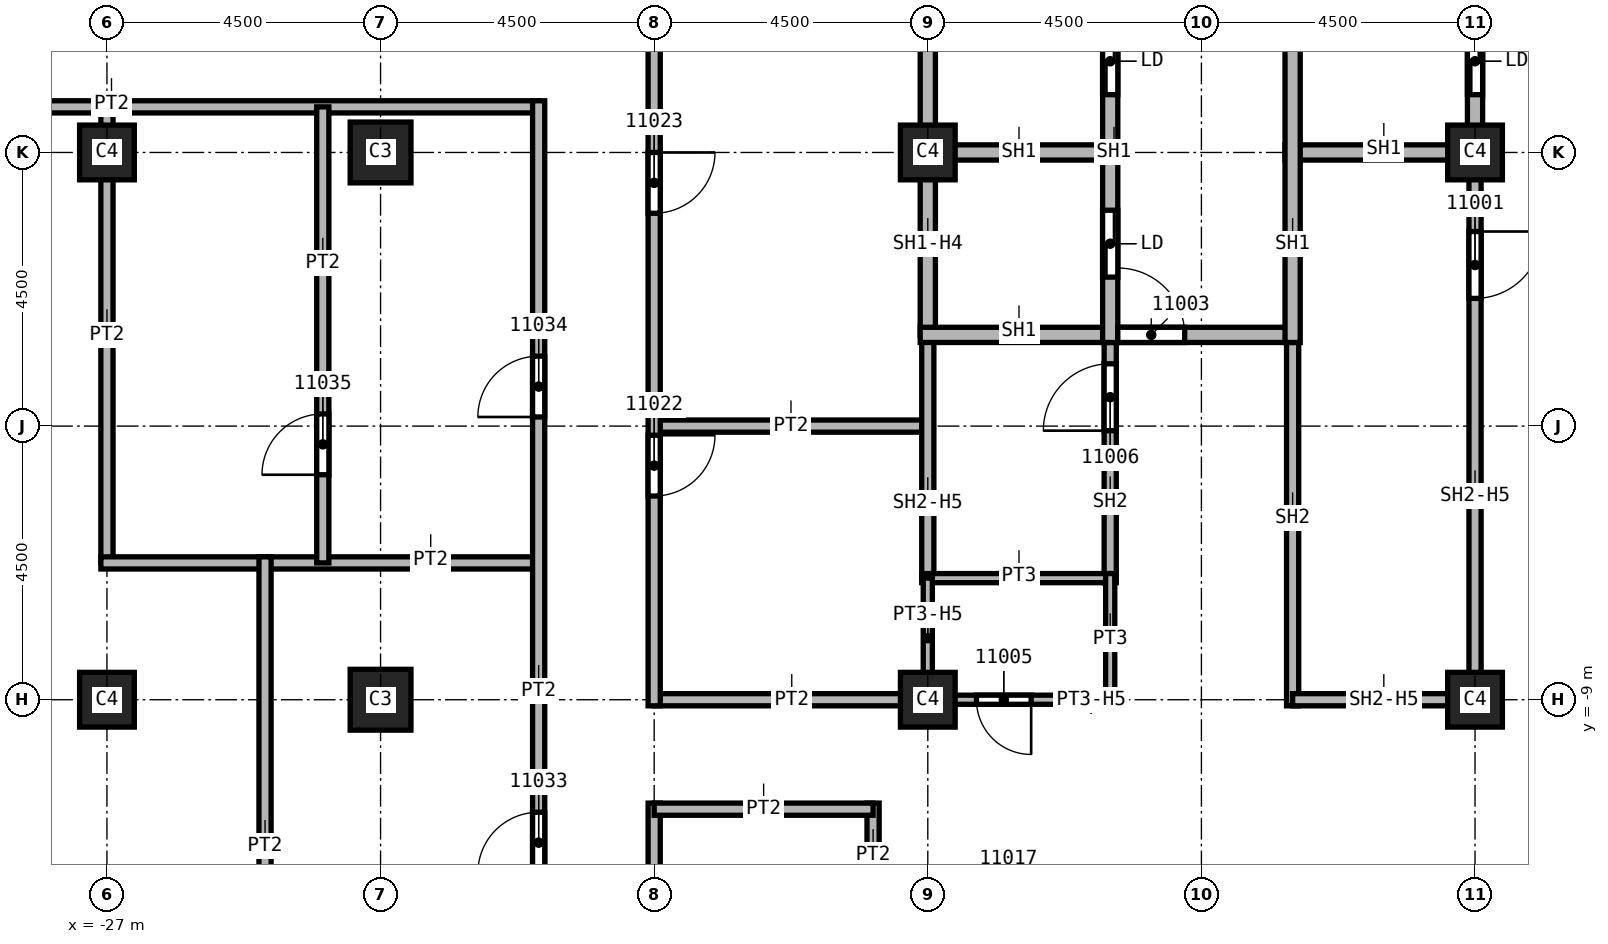
"""IFC4 building model, lengths in metres.
Left out: names, types, materials, properties, quantities, classifications, styles, units other than length and angle.
Written with IfcOpenShell. Run it as: python <this file> out.ifc"""

import sys

from ifc_helpers import new_model, si_unit, direction, frame, frame_2d, origin, origin_2d, place, context, subcontext, project, spatial, rectangle, extrude, element, fill, save


model = new_model("IFC4")
c1 = context("Model", 3, precision=1e-05, world=origin(), true_north=direction((0.0, 1.0)))
c2 = subcontext(c1, "Body", "Model", "MODEL_VIEW")
j1 = project(units=[si_unit("LENGTHUNIT", "METRE"), si_unit("PLANEANGLEUNIT", "RADIAN")], contexts=[c1])
p1 = place(None, origin())
s1 = spatial("IfcSite", under=j1, at=p1, CompositionType="ELEMENT")
p2 = place(p1, origin())
s2 = spatial("IfcBuilding", under=s1, at=p2, CompositionType="ELEMENT")
p3 = place(p2, frame((0.0, 0.0, 184.0)))
s3 = spatial("IfcBuildingStorey", under=s2, at=p3, CompositionType="ELEMENT", Elevation=184.0)
for number, where, z_axis, x_axis in (
    (1, (-22.5, 0.0, 0.0), (0.0, 0.0, 1.0), (1.0, 0.0, 0.0)),
    (2, (-22.5, -9.0, 0.0), (0.0, 0.0, 1.0), (1.0, 0.0, 0.0)),
):
    element("IfcColumn", number, at=place(p3, frame(where, z_axis=z_axis, x_axis=x_axis)), inside=s3, PredefinedType="COLUMN", context=c2, shape_type="SweptSolid", body=[
        extrude(rectangle(XDim=1.0, YDim=1.0, at=origin_2d()), origin(), (0.0, 0.0, 1.0), 3.72),
    ])
for number, where, z_axis, x_axis in (
    (3, (-4.5, 0.0, 0.0), (0.0, 0.0, 1.0), (1.0, 0.0, 0.0)),
    (4, (-4.5, -9.0, 0.0), (0.0, 0.0, 1.0), (1.0, 0.0, 0.0)),
    (5, (-13.5, 0.0, 0.0), (0.0, 0.0, 1.0), (1.0, 0.0, 0.0)),
    (6, (-13.5, -9.0, 0.0), (0.0, 0.0, 1.0), (1.0, 0.0, 0.0)),
    (7, (-27.0, 0.0, 0.0), (0.0, 0.0, 1.0), (1.0, 0.0, 0.0)),
    (8, (-27.0, -9.0, 0.0), (0.0, 0.0, 1.0), (1.0, 0.0, 0.0)),
):
    element("IfcColumn", number, at=place(p3, frame(where, z_axis=z_axis, x_axis=x_axis)), inside=s3, PredefinedType="COLUMN", context=c2, shape_type="SweptSolid", body=[
        extrude(rectangle(XDim=0.9, YDim=0.9, at=origin_2d()), origin(), (0.0, 0.0, 1.0), 3.72),
    ])
p4 = place(p3, frame((-27.0, -6.75, 0.0), z_axis=(0.0, 0.0, 1.0), x_axis=(0.0, 1.0, 0.0)))
e9 = element("IfcWall", 9, at=p4, inside=s3, PredefinedType="PARTITIONING", context=c2, shape_type="SweptSolid", body=[
    extrude(rectangle(XDim=7.5, YDim=0.2, at=frame_2d((3.75, 0.0))), origin(), (0.0, 0.0, 1.0), 3.72),
])
p5 = place(p3, frame((-19.9, 0.75, 0.0), z_axis=(0.0, 0.0, 1.0), x_axis=(-1.0, 0.0, 0.0)))
e10 = element("IfcWall", 10, at=p5, inside=s3, PredefinedType="PARTITIONING", context=c2, shape_type="SweptSolid", body=[
    extrude(rectangle(XDim=13.95, YDim=0.2, at=frame_2d((6.975, 0.0))), origin(), (0.0, 0.0, 1.0), 3.72),
])
p6 = place(p3, frame((-27.1, -6.75, 0.0), z_axis=(0.0, 0.0, 1.0), x_axis=(1.0, 0.0, 0.0)))
e11 = element("IfcWall", 11, at=p6, inside=s3, PredefinedType="PARTITIONING", context=c2, shape_type="SweptSolid", body=[
    extrude(rectangle(XDim=7.2, YDim=0.2, at=frame_2d((3.6, 0.0))), origin(), (0.0, 0.0, 1.0), 3.72),
])
p7 = place(p3, frame((-24.4, -17.5, 0.0), z_axis=(0.0, 0.0, 1.0), x_axis=(0.0, 1.0, 0.0)))
e12 = element("IfcWall", 12, at=p7, inside=s3, PredefinedType="PARTITIONING", context=c2, shape_type="SweptSolid", body=[
    extrude(rectangle(XDim=10.85, YDim=0.2, at=frame_2d((5.425, 0.0))), origin(), (0.0, 0.0, 1.0), 3.72),
])
p8 = place(p3, frame((-23.45, -6.75, 0.0), z_axis=(0.0, 0.0, 1.0), x_axis=(0.0, 1.0, 0.0)))
e13 = element("IfcWall", 13, at=p8, inside=s3, PredefinedType="PARTITIONING", context=c2, shape_type="SweptSolid", body=[
    extrude(rectangle(XDim=7.5, YDim=0.2, at=frame_2d((3.75, 0.0))), origin(), (0.0, 0.0, 1.0), 3.72),
])
p9 = place(p8, frame((1.45, 0.0, 0.0)))
e14 = element("IfcOpeningElement", 14, at=p9, cuts=e13, PredefinedType="OPENING", context=c2, shape_type="SweptSolid", body=[
    extrude(rectangle(XDim=1.0, YDim=2.1, at=frame_2d((0.5, 1.05))), frame((0.0, 0.1, 0.0), z_axis=(0.0, -1.0, 0.0), x_axis=(1.0, 0.0, 0.0)), (0.0, 0.0, 1.0), 0.2),
])
p10 = place(p3, frame((-19.9, -22.4, 0.0), z_axis=(0.0, 0.0, 1.0), x_axis=(0.0, 1.0, 0.0)))
e15 = element("IfcWall", 15, at=p10, inside=s3, PredefinedType="PARTITIONING", context=c2, shape_type="SweptSolid", body=[
    extrude(rectangle(XDim=23.25, YDim=0.2, at=frame_2d((11.625, 0.0))), origin(), (0.0, 0.0, 1.0), 3.72),
])
p11 = place(p10, frame((3.7, 0.0, 0.0)))
e16 = element("IfcOpeningElement", 16, at=p11, cuts=e15, PredefinedType="OPENING", context=c2, shape_type="SweptSolid", body=[
    extrude(rectangle(XDim=1.0, YDim=2.1, at=frame_2d((0.5, 1.05))), frame((0.0, 0.1, 0.0), z_axis=(0.0, -1.0, 0.0), x_axis=(1.0, 0.0, 0.0)), (0.0, 0.0, 1.0), 0.2),
])
p12 = place(p10, frame((10.55, 0.0, 0.0)))
e17 = element("IfcOpeningElement", 17, at=p12, cuts=e15, PredefinedType="OPENING", context=c2, shape_type="SweptSolid", body=[
    extrude(rectangle(XDim=1.0, YDim=2.1, at=frame_2d((0.5, 1.05))), frame((0.0, 0.1, 0.0), z_axis=(0.0, -1.0, 0.0), x_axis=(1.0, 0.0, 0.0)), (0.0, 0.0, 1.0), 0.2),
])
p13 = place(p10, frame((18.05, 0.0, 0.0)))
e18 = element("IfcOpeningElement", 18, at=p13, cuts=e15, PredefinedType="OPENING", context=c2, shape_type="SweptSolid", body=[
    extrude(rectangle(XDim=1.0, YDim=2.1, at=frame_2d((0.5, 1.05))), frame((0.0, 0.1, 0.0), z_axis=(0.0, -1.0, 0.0), x_axis=(1.0, 0.0, 0.0)), (0.0, 0.0, 1.0), 0.2),
])
p14 = place(p3, frame((-18.0, -10.7, 0.0), z_axis=(0.0, 0.0, 1.0), x_axis=(0.0, -1.0, 0.0)))
e19 = element("IfcWall", 19, at=p14, inside=s3, PredefinedType="PARTITIONING", context=c2, shape_type="SweptSolid", body=[
    extrude(rectangle(XDim=11.6, YDim=0.2, at=frame_2d((5.8, 0.0))), origin(), (0.0, 0.0, 1.0), 3.72),
])
p15 = place(p14, frame((3.35, 0.0, 0.0)))
e20 = element("IfcOpeningElement", 20, at=p15, cuts=e19, PredefinedType="OPENING", context=c2, shape_type="SweptSolid", body=[
    extrude(rectangle(XDim=1.0, YDim=2.1, at=frame_2d((0.5, 1.05))), frame((0.0, 0.1, 0.0), z_axis=(0.0, -1.0, 0.0), x_axis=(1.0, 0.0, 0.0)), (0.0, 0.0, 1.0), 0.2),
])
for number, where, z_axis, x_axis in (
    (21, (-18.0, -9.0, 0.0), (0.0, 0.0, 1.0), (1.0, 0.0, 0.0)),
    (22, (-18.0, -4.5, 0.0), (0.0, 0.0, 1.0), (1.0, 0.0, 0.0)),
):
    element("IfcWall", number, at=place(p3, frame(where, z_axis=z_axis, x_axis=x_axis)), inside=s3, PredefinedType="PARTITIONING", context=c2, shape_type="SweptSolid", body=[
        extrude(rectangle(XDim=4.5, YDim=0.2, at=frame_2d((2.25, 0.0))), origin(), (0.0, 0.0, 1.0), 3.72),
    ])
p16 = place(p3, frame((-18.0, 9.1, 0.0), z_axis=(0.0, 0.0, 1.0), x_axis=(0.0, -1.0, 0.0)))
e23 = element("IfcWall", 23, at=p16, inside=s3, PredefinedType="PARTITIONING", context=c2, shape_type="SweptSolid", body=[
    extrude(rectangle(XDim=18.2, YDim=0.2, at=frame_2d((9.1, 0.0))), origin(), (0.0, 0.0, 1.0), 3.72),
])
p17 = place(p16, frame((13.75, 0.0, 0.0)))
e24 = element("IfcOpeningElement", 24, at=p17, cuts=e23, PredefinedType="OPENING", context=c2, shape_type="SweptSolid", body=[
    extrude(rectangle(XDim=1.0, YDim=2.1, at=frame_2d((0.5, 1.05))), frame((0.0, 0.1, 0.0), z_axis=(0.0, -1.0, 0.0), x_axis=(1.0, 0.0, 0.0)), (0.0, 0.0, 1.0), 0.2),
])
p18 = place(p16, frame((9.1, 0.0, 0.0)))
e25 = element("IfcOpeningElement", 25, at=p18, cuts=e23, PredefinedType="OPENING", context=c2, shape_type="SweptSolid", body=[
    extrude(rectangle(XDim=1.0, YDim=2.1, at=frame_2d((0.5, 1.05))), frame((0.0, 0.1, 0.0), z_axis=(0.0, -1.0, 0.0), x_axis=(1.0, 0.0, 0.0)), (0.0, 0.0, 1.0), 0.2),
])
p19 = place(p3, frame((-14.4, -12.3, 0.0), z_axis=(0.0, 0.0, 1.0), x_axis=(0.0, 1.0, 0.0)))
e26 = element("IfcWall", 26, at=p19, inside=s3, PredefinedType="PARTITIONING", context=c2, shape_type="SweptSolid", body=[
    extrude(rectangle(XDim=1.6, YDim=0.2, at=frame_2d((0.8, 0.0))), origin(), (0.0, 0.0, 1.0), 3.72),
])
p20 = place(p3, frame((-14.4, -10.8, 0.0), z_axis=(0.0, 0.0, 1.0), x_axis=(-1.0, 0.0, 0.0)))
e27 = element("IfcWall", 27, at=p20, inside=s3, PredefinedType="PARTITIONING", context=c2, shape_type="SweptSolid", body=[
    extrude(rectangle(XDim=3.6, YDim=0.2, at=frame_2d((1.8, 0.0))), origin(), (0.0, 0.0, 1.0), 3.72),
])
p21 = place(p3, frame((-13.5, -7.0, 0.0), z_axis=(0.0, 0.0, 1.0), x_axis=(0.0, 1.0, 0.0)))
e28 = element("IfcWall", 28, at=p21, inside=s3, PredefinedType="SOLIDWALL", context=c2, shape_type="SweptSolid", body=[
    extrude(rectangle(XDim=4.0, YDim=0.2, at=frame_2d((2.0, 0.0))), origin(), (0.0, 0.0, 1.0), 2.958),
])
p22 = place(p3, frame((-10.5, -7.075, 0.0), z_axis=(0.0, 0.0, 1.0), x_axis=(0.0, 1.0, 0.0)))
e29 = element("IfcWall", 29, at=p22, inside=s3, PredefinedType="SOLIDWALL", context=c2, shape_type="SweptSolid", body=[
    extrude(rectangle(XDim=4.2, YDim=0.2, at=frame_2d((2.1, 0.0))), origin(), (0.0, 0.0, 1.0), 3.72),
])
p23 = place(p22, frame((2.5, 0.0, 0.0)))
e30 = element("IfcOpeningElement", 30, at=p23, cuts=e29, PredefinedType="OPENING", context=c2, shape_type="SweptSolid", body=[
    extrude(rectangle(XDim=1.1, YDim=2.1, at=frame_2d((0.55, 1.05))), frame((0.0, 0.1, 0.0), z_axis=(0.0, -1.0, 0.0), x_axis=(1.0, 0.0, 0.0)), (0.0, 0.0, 1.0), 0.2),
])
p24 = place(p3, frame((-7.5, -9.1, 0.0), z_axis=(0.0, 0.0, 1.0), x_axis=(0.0, 1.0, 0.0)))
e31 = element("IfcWall", 31, at=p24, inside=s3, PredefinedType="SOLIDWALL", context=c2, shape_type="SweptSolid", body=[
    extrude(rectangle(XDim=6.225, YDim=0.2, at=frame_2d((3.113, 0.0))), origin(), (0.0, 0.0, 1.0), 3.72),
])
p25 = place(p3, frame((-4.5, -9.0, 0.0), z_axis=(0.0, 0.0, 1.0), x_axis=(-1.0, 0.0, 0.0)))
e32 = element("IfcWall", 32, at=p25, inside=s3, PredefinedType="SOLIDWALL", context=c2, shape_type="SweptSolid", body=[
    extrude(rectangle(XDim=3.0, YDim=0.2, at=frame_2d((1.5, 0.0))), origin(), (0.0, 0.0, 1.0), 2.958),
])
p26 = place(p3, frame((-4.5, 0.0, 0.0), z_axis=(0.0, 0.0, 1.0), x_axis=(0.0, -1.0, 0.0)))
e33 = element("IfcWall", 33, at=p26, inside=s3, PredefinedType="SOLIDWALL", context=c2, shape_type="SweptSolid", body=[
    extrude(rectangle(XDim=9.1, YDim=0.2, at=frame_2d((4.55, 0.0))), origin(), (0.0, 0.0, 1.0), 2.958),
])
p27 = place(p26, frame((1.3, 0.0, 0.0)))
e34 = element("IfcOpeningElement", 34, at=p27, cuts=e33, PredefinedType="OPENING", context=c2, shape_type="SweptSolid", body=[
    extrude(rectangle(XDim=1.1, YDim=2.1, at=frame_2d((0.55, 1.05))), frame((0.0, 0.1, 0.0), z_axis=(0.0, -1.0, 0.0), x_axis=(1.0, 0.0, 0.0)), (0.0, 0.0, 1.0), 0.2),
])
p28 = place(p3, frame((-13.625, 0.0, 0.0), z_axis=(0.0, 0.0, 1.0), x_axis=(1.0, 0.0, 0.0)))
e35 = element("IfcWall", 35, at=p28, inside=s3, PredefinedType="SOLIDWALL", context=c2, shape_type="SweptSolid", body=[
    extrude(rectangle(XDim=3.125, YDim=0.25, at=frame_2d((1.562, 0.0))), origin(), (0.0, 0.0, 1.0), 3.72),
])
p29 = place(p3, frame((-13.5, -3.0, 0.0), z_axis=(0.0, 0.0, 1.0), x_axis=(0.0, 1.0, 0.0)))
e36 = element("IfcWall", 36, at=p29, inside=s3, PredefinedType="SOLIDWALL", context=c2, shape_type="SweptSolid", body=[
    extrude(rectangle(XDim=6.0, YDim=0.25, at=frame_2d((3.0, 0.0))), origin(), (0.0, 0.0, 1.0), 2.958),
])
p30 = place(p3, frame((-13.625, -3.0, 0.0), z_axis=(0.0, 0.0, 1.0), x_axis=(1.0, 0.0, 0.0)))
e37 = element("IfcWall", 37, at=p30, inside=s3, PredefinedType="SOLIDWALL", context=c2, shape_type="SweptSolid", body=[
    extrude(rectangle(XDim=6.125, YDim=0.25, at=frame_2d((3.062, 0.0))), origin(), (0.0, 0.0, 1.0), 3.72),
])
p31 = place(p30, frame((3.25, 0.0, 0.0)))
e38 = element("IfcOpeningElement", 38, at=p31, cuts=e37, PredefinedType="OPENING", context=c2, shape_type="SweptSolid", body=[
    extrude(rectangle(XDim=1.1, YDim=2.1, at=frame_2d((0.55, 1.05))), frame((0.0, 0.125, 0.0), z_axis=(0.0, -1.0, 0.0), x_axis=(1.0, 0.0, 0.0)), (0.0, 0.0, 1.0), 0.25),
])
p32 = place(p3, frame((-10.5, -3.125, 0.0), z_axis=(0.0, 0.0, 1.0), x_axis=(0.0, 1.0, 0.0)))
e39 = element("IfcWall", 39, at=p32, inside=s3, PredefinedType="SOLIDWALL", context=c2, shape_type="SweptSolid", body=[
    extrude(rectangle(XDim=6.25, YDim=0.25, at=frame_2d((3.125, 0.0))), origin(), (0.0, 0.0, 1.0), 3.72),
])
p33 = place(p32, frame((1.075, 0.0, 0.0)))
e40 = element("IfcOpeningElement", 40, at=p33, cuts=e39, PredefinedType="OPENING", context=c2, shape_type="SweptSolid", body=[
    extrude(rectangle(XDim=1.1, YDim=2.1, at=frame_2d((0.55, 1.05))), frame((0.0, 0.125, 0.0), z_axis=(0.0, -1.0, 0.0), x_axis=(1.0, 0.0, 0.0)), (0.0, 0.0, 1.0), 0.25),
])
p34 = place(p32, frame((4.075, 0.0, 0.0)))
e41 = element("IfcOpeningElement", 41, at=p34, cuts=e39, PredefinedType="OPENING", context=c2, shape_type="SweptSolid", body=[
    extrude(rectangle(XDim=1.1, YDim=2.1, at=frame_2d((0.55, 1.05))), frame((0.0, 0.125, 0.0), z_axis=(0.0, -1.0, 0.0), x_axis=(1.0, 0.0, 0.0)), (0.0, 0.0, 1.0), 0.25),
])
p35 = place(p3, frame((-7.625, 0.0, 0.0), z_axis=(0.0, 0.0, 1.0), x_axis=(1.0, 0.0, 0.0)))
e42 = element("IfcWall", 42, at=p35, inside=s3, PredefinedType="SOLIDWALL", context=c2, shape_type="SweptSolid", body=[
    extrude(rectangle(XDim=3.25, YDim=0.25, at=frame_2d((1.625, 0.0))), origin(), (0.0, 0.0, 1.0), 3.72),
])
p36 = place(p3, frame((-7.5, -3.125, 0.0), z_axis=(0.0, 0.0, 1.0), x_axis=(0.0, 1.0, 0.0)))
e43 = element("IfcWall", 43, at=p36, inside=s3, PredefinedType="SOLIDWALL", context=c2, shape_type="SweptSolid", body=[
    extrude(rectangle(XDim=9.125, YDim=0.25, at=frame_2d((4.562, 0.0))), origin(), (0.0, 0.0, 1.0), 3.72),
])
p37 = place(p3, frame((-4.5, 6.0, 0.0), z_axis=(0.0, 0.0, 1.0), x_axis=(0.0, -1.0, 0.0)))
e44 = element("IfcWall", 44, at=p37, inside=s3, PredefinedType="SOLIDWALL", context=c2, shape_type="SweptSolid", body=[
    extrude(rectangle(XDim=6.0, YDim=0.25, at=frame_2d((3.0, 0.0))), origin(), (0.0, 0.0, 1.0), 2.958),
])
p38 = place(p37, frame((3.95, 0.0, 0.0)))
e45 = element("IfcOpeningElement", 45, at=p38, cuts=e44, PredefinedType="OPENING", context=c2, shape_type="SweptSolid", body=[
    extrude(rectangle(XDim=1.1, YDim=2.1, at=frame_2d((0.55, 1.05))), frame((0.0, 0.125, 0.0), z_axis=(0.0, -1.0, 0.0), x_axis=(1.0, 0.0, 0.0)), (0.0, 0.0, 1.0), 0.25),
])
p39 = place(p37, frame((0.95, 0.0, 0.0)))
e46 = element("IfcOpeningElement", 46, at=p39, cuts=e44, PredefinedType="OPENING", context=c2, shape_type="SweptSolid", body=[
    extrude(rectangle(XDim=1.1, YDim=2.1, at=frame_2d((0.55, 1.05))), frame((0.0, 0.125, 0.0), z_axis=(0.0, -1.0, 0.0), x_axis=(1.0, 0.0, 0.0)), (0.0, 0.0, 1.0), 0.25),
])
p40 = place(p3, frame((-13.6, -7.0, 0.0), z_axis=(0.0, 0.0, 1.0), x_axis=(1.0, 0.0, 0.0)))
e47 = element("IfcWall", 47, at=p40, inside=s3, PredefinedType="PARTITIONING", context=c2, shape_type="SweptSolid", body=[
    extrude(rectangle(XDim=3.1, YDim=0.15, at=frame_2d((1.55, 0.0))), origin(), (0.0, 0.0, 1.0), 3.72),
])
p41 = place(p3, frame((-13.5, -9.1, 0.0), z_axis=(0.0, 0.0, 1.0), x_axis=(0.0, 1.0, 0.0)))
e48 = element("IfcWall", 48, at=p41, inside=s3, PredefinedType="PARTITIONING", context=c2, shape_type="SweptSolid", body=[
    extrude(rectangle(XDim=2.1, YDim=0.15, at=frame_2d((1.05, 0.0))), origin(), (0.0, 0.0, 1.0), 2.958),
])
p42 = place(p3, frame((-10.5, -9.075, 0.0), z_axis=(0.0, 0.0, 1.0), x_axis=(0.0, 1.0, 0.0)))
e49 = element("IfcWall", 49, at=p42, inside=s3, PredefinedType="PARTITIONING", context=c2, shape_type="SweptSolid", body=[
    extrude(rectangle(XDim=2.15, YDim=0.15, at=frame_2d((1.075, 0.0))), origin(), (0.0, 0.0, 1.0), 3.72),
])
p43 = place(p3, frame((-10.5, -9.0, 0.0), z_axis=(0.0, 0.0, 1.0), x_axis=(-1.0, 0.0, 0.0)))
e50 = element("IfcWall", 50, at=p43, inside=s3, PredefinedType="PARTITIONING", context=c2, shape_type="SweptSolid", body=[
    extrude(rectangle(XDim=3.075, YDim=0.15, at=frame_2d((1.538, 0.0))), origin(), (0.0, 0.0, 1.0), 2.958),
])
p44 = place(p43, frame((1.3, 0.0, 0.0)))
e51 = element("IfcOpeningElement", 51, at=p44, cuts=e50, PredefinedType="OPENING", context=c2, shape_type="SweptSolid", body=[
    extrude(rectangle(XDim=0.9, YDim=2.1, at=frame_2d((0.45, 1.05))), frame((0.0, 0.075, 0.0), z_axis=(0.0, -1.0, 0.0), x_axis=(1.0, 0.0, 0.0)), (0.0, 0.0, 1.0), 0.15),
])
p45 = place(p27, origin())
e52 = element("IfcDoor", 52, at=p45, inside=s3, OperationType="SINGLE_SWING_RIGHT", PredefinedType="DOOR", context=c2, shape_type="SweptSolid", body=[
    extrude(rectangle(XDim=1.1, YDim=2.1, at=frame_2d((0.55, 1.05))), frame((0.0, 0.025, 0.0), z_axis=(0.0, -1.0, 0.0), x_axis=(1.0, 0.0, 0.0)), (0.0, 0.0, 1.0), 0.05),
])
fill(e34, e52)
p46 = place(p31, origin())
e53 = element("IfcDoor", 53, at=p46, inside=s3, OperationType="SINGLE_SWING_RIGHT", PredefinedType="DOOR", context=c2, shape_type="SweptSolid", body=[
    extrude(rectangle(XDim=1.1, YDim=2.1, at=frame_2d((0.55, 1.05))), frame((0.0, 0.025, 0.0), z_axis=(0.0, -1.0, 0.0), x_axis=(1.0, 0.0, 0.0)), (0.0, 0.0, 1.0), 0.05),
])
fill(e38, e53)
p47 = place(p44, origin())
e54 = element("IfcDoor", 54, at=p47, inside=s3, OperationType="SINGLE_SWING_RIGHT", PredefinedType="DOOR", context=c2, shape_type="SweptSolid", body=[
    extrude(rectangle(XDim=0.9, YDim=2.1, at=frame_2d((0.45, 1.05))), frame((0.0, 0.025, 0.0), z_axis=(0.0, -1.0, 0.0), x_axis=(1.0, 0.0, 0.0)), (0.0, 0.0, 1.0), 0.05),
])
fill(e51, e54)
p48 = place(p23, origin())
e55 = element("IfcDoor", 55, at=p48, inside=s3, OperationType="SINGLE_SWING_LEFT", PredefinedType="DOOR", context=c2, shape_type="SweptSolid", body=[
    extrude(rectangle(XDim=1.1, YDim=2.1, at=frame_2d((0.55, 1.05))), frame((0.0, 0.025, 0.0), z_axis=(0.0, -1.0, 0.0), x_axis=(1.0, 0.0, 0.0)), (0.0, 0.0, 1.0), 0.05),
])
fill(e30, e55)
p49 = place(p17, origin())
e56 = element("IfcDoor", 56, at=p49, inside=s3, OperationType="SINGLE_SWING_LEFT", PredefinedType="DOOR", context=c2, shape_type="SweptSolid", body=[
    extrude(rectangle(XDim=1.0, YDim=2.1, at=frame_2d((0.5, 1.05))), frame((0.0, 0.025, 0.0), z_axis=(0.0, -1.0, 0.0), x_axis=(1.0, 0.0, 0.0)), (0.0, 0.0, 1.0), 0.05),
])
fill(e24, e56)
p50 = place(p18, origin())
e57 = element("IfcDoor", 57, at=p50, inside=s3, OperationType="SINGLE_SWING_RIGHT", PredefinedType="DOOR", context=c2, shape_type="SweptSolid", body=[
    extrude(rectangle(XDim=1.0, YDim=2.1, at=frame_2d((0.5, 1.05))), frame((0.0, 0.025, 0.0), z_axis=(0.0, -1.0, 0.0), x_axis=(1.0, 0.0, 0.0)), (0.0, 0.0, 1.0), 0.05),
])
fill(e25, e57)
p51 = place(p12, origin())
e58 = element("IfcDoor", 58, at=p51, inside=s3, OperationType="SINGLE_SWING_RIGHT", PredefinedType="DOOR", context=c2, shape_type="SweptSolid", body=[
    extrude(rectangle(XDim=1.0, YDim=2.1, at=frame_2d((0.5, 1.05))), frame((0.0, 0.025, 0.0), z_axis=(0.0, -1.0, 0.0), x_axis=(1.0, 0.0, 0.0)), (0.0, 0.0, 1.0), 0.05),
])
fill(e17, e58)
p52 = place(p13, origin())
e59 = element("IfcDoor", 59, at=p52, inside=s3, OperationType="SINGLE_SWING_LEFT", PredefinedType="DOOR", context=c2, shape_type="SweptSolid", body=[
    extrude(rectangle(XDim=1.0, YDim=2.1, at=frame_2d((0.5, 1.05))), frame((0.0, 0.025, 0.0), z_axis=(0.0, -1.0, 0.0), x_axis=(1.0, 0.0, 0.0)), (0.0, 0.0, 1.0), 0.05),
])
fill(e18, e59)
p53 = place(p9, origin())
e60 = element("IfcDoor", 60, at=p53, inside=s3, OperationType="SINGLE_SWING_RIGHT", PredefinedType="DOOR", context=c2, shape_type="SweptSolid", body=[
    extrude(rectangle(XDim=1.0, YDim=2.1, at=frame_2d((0.5, 1.05))), frame((0.0, 0.025, 0.0), z_axis=(0.0, -1.0, 0.0), x_axis=(1.0, 0.0, 0.0)), (0.0, 0.0, 1.0), 0.05),
])
fill(e14, e60)
p54 = place(p38, origin())
e61 = element("IfcDoor", 61, at=p54, inside=s3, OperationType="SLIDING_TO_LEFT", PredefinedType="DOOR", context=c2, shape_type="SweptSolid", body=[
    extrude(rectangle(XDim=1.1, YDim=2.1, at=frame_2d((0.55, 1.05))), frame((0.0, 0.025, 0.0), z_axis=(0.0, -1.0, 0.0), x_axis=(1.0, 0.0, 0.0)), (0.0, 0.0, 1.0), 0.05),
])
fill(e45, e61)
p55 = place(p33, origin())
e62 = element("IfcDoor", 62, at=p55, inside=s3, OperationType="SLIDING_TO_LEFT", PredefinedType="DOOR", context=c2, shape_type="SweptSolid", body=[
    extrude(rectangle(XDim=1.1, YDim=2.1, at=frame_2d((0.55, 1.05))), frame((0.0, 0.025, 0.0), z_axis=(0.0, -1.0, 0.0), x_axis=(1.0, 0.0, 0.0)), (0.0, 0.0, 1.0), 0.05),
])
fill(e40, e62)
p56 = place(p34, origin())
e63 = element("IfcDoor", 63, at=p56, inside=s3, OperationType="SLIDING_TO_LEFT", PredefinedType="DOOR", context=c2, shape_type="SweptSolid", body=[
    extrude(rectangle(XDim=1.1, YDim=2.1, at=frame_2d((0.55, 1.05))), frame((0.0, 0.025, 0.0), z_axis=(0.0, -1.0, 0.0), x_axis=(1.0, 0.0, 0.0)), (0.0, 0.0, 1.0), 0.05),
])
fill(e41, e63)
save(model, sys.argv[1])
